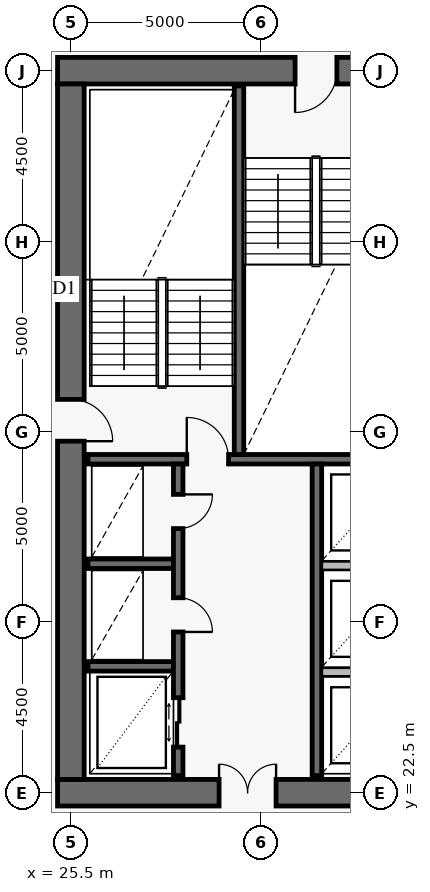
"""IFC4 building model, lengths in metres.
Left out: names, types, materials, properties, quantities, classifications, styles, units other than length and angle.
Written with IfcOpenShell. Run it as: python <this file> out.ifc"""

import sys

from ifc_helpers import new_model, si_unit, direction, frame, frame_2d, origin, place, context, subcontext, project, spatial, rectangle, extrude, element, fill, save


model = new_model("IFC4")
c1 = context("Model", 3, precision=1e-05, world=origin(), true_north=direction((0.0, 1.0)))
c2 = subcontext(c1, "Body", "Model", "MODEL_VIEW")
j1 = project(units=[si_unit("LENGTHUNIT", "METRE"), si_unit("PLANEANGLEUNIT", "RADIAN")], contexts=[c1])
p1 = place(None, origin())
s1 = spatial("IfcSite", under=j1, at=p1, CompositionType="ELEMENT")
p2 = place(p1, origin())
s2 = spatial("IfcBuilding", under=s1, at=p2, CompositionType="ELEMENT")
p3 = place(p2, frame((0.0, 0.0, 138.0)))
s3 = spatial("IfcBuildingStorey", under=s2, at=p3, CompositionType="ELEMENT", Elevation=138.0)
p4 = place(p3, frame((25.15, 22.5, 0.0), z_axis=(0.0, 0.0, 1.0), x_axis=(1.0, 0.0, 0.0)))
e1 = element("IfcWall", 1, at=p4, inside=s3, PredefinedType="SHEAR", context=c2, shape_type="SweptSolid", body=[
    extrude(rectangle(XDim=9.9, YDim=0.7, at=frame_2d((4.95, 0.0))), origin(), (0.0, 0.0, 1.0), 3.8),
])
p5 = place(p4, frame((4.25, 0.0, 0.0)))
e2 = element("IfcOpeningElement", 2, at=p5, cuts=e1, PredefinedType="OPENING", context=c2, shape_type="SweptSolid", body=[
    extrude(rectangle(XDim=1.5, YDim=2.15, at=frame_2d((0.75, 1.075))), frame((0.0, 0.362, 0.0), z_axis=(0.0, -1.0, 0.0), x_axis=(1.0, 0.0, 0.0)), (0.0, 0.0, 1.0), 0.724),
])
p6 = place(p3, frame((36.75, 41.5, 0.0), z_axis=(0.0, 0.0, 1.0), x_axis=(-1.0, 0.0, 0.0)))
e3 = element("IfcWall", 3, at=p6, inside=s3, PredefinedType="SHEAR", context=c2, shape_type="SweptSolid", body=[
    extrude(rectangle(XDim=11.6, YDim=0.7, at=frame_2d((5.8, 0.0))), origin(), (0.0, 0.0, 1.0), 3.8),
])
p7 = place(p6, frame((4.25, 0.0, 0.0)))
e4 = element("IfcOpeningElement", 4, at=p7, cuts=e3, PredefinedType="OPENING", context=c2, shape_type="SweptSolid", body=[
    extrude(rectangle(XDim=1.1, YDim=2.15, at=frame_2d((0.55, 1.075))), frame((0.0, 0.362, 0.0), z_axis=(0.0, -1.0, 0.0), x_axis=(1.0, 0.0, 0.0)), (0.0, 0.0, 1.0), 0.724),
])
p8 = place(p3, frame((25.5, 22.85, 0.0), z_axis=(0.0, 0.0, 1.0), x_axis=(0.0, 1.0, 0.0)))
e5 = element("IfcWall", 5, at=p8, inside=s3, PredefinedType="SHEAR", context=c2, shape_type="SweptSolid", body=[
    extrude(rectangle(XDim=18.3, YDim=0.7, at=frame_2d((9.15, 0.0))), origin(), (0.0, 0.0, 1.0), 3.8),
])
p9 = place(p8, frame((8.9, 0.0, 0.0)))
e6 = element("IfcOpeningElement", 6, at=p9, cuts=e5, PredefinedType="OPENING", context=c2, shape_type="SweptSolid", body=[
    extrude(rectangle(XDim=1.1, YDim=2.15, at=frame_2d((0.55, 1.075))), frame((0.0, 0.362, 0.0), z_axis=(0.0, -1.0, 0.0), x_axis=(1.0, 0.0, 0.0)), (0.0, 0.0, 1.0), 0.724),
])
p10 = place(p3, frame((25.95, 31.275, 0.0), z_axis=(0.0, 0.0, 1.0), x_axis=(1.0, 0.0, 0.0)))
e7 = element("IfcWall", 7, at=p10, inside=s3, PredefinedType="SOLIDWALL", context=c2, shape_type="SweptSolid", body=[
    extrude(rectangle(XDim=20.1, YDim=0.25, at=frame_2d((10.05, 0.0))), origin(), (0.0, 0.0, 1.0), 3.8),
])
p11 = place(p10, frame((2.6, 0.0, 0.0)))
e8 = element("IfcOpeningElement", 8, at=p11, cuts=e7, PredefinedType="OPENING", context=c2, shape_type="SweptSolid", body=[
    extrude(rectangle(XDim=1.1, YDim=2.15, at=frame_2d((0.55, 1.075))), frame((0.0, 0.137, 0.0), z_axis=(0.0, -1.0, 0.0), x_axis=(1.0, 0.0, 0.0)), (0.0, 0.0, 1.0), 0.274),
])
p12 = place(p10, frame((10.6, 0.0, 0.0)))
e9 = element("IfcOpeningElement", 9, at=p12, cuts=e7, PredefinedType="OPENING", context=c2, shape_type="SweptSolid", body=[
    extrude(rectangle(XDim=1.1, YDim=2.15, at=frame_2d((0.55, 1.075))), frame((0.0, 0.137, 0.0), z_axis=(0.0, -1.0, 0.0), x_axis=(1.0, 0.0, 0.0)), (0.0, 0.0, 1.0), 0.274),
])
p13 = place(p10, frame((16.35, 0.0, 0.0)))
e10 = element("IfcOpeningElement", 10, at=p13, cuts=e7, PredefinedType="OPENING", context=c2, shape_type="SweptSolid", body=[
    extrude(rectangle(XDim=1.1, YDim=2.15, at=frame_2d((0.55, 1.075))), frame((0.0, 0.137, 0.0), z_axis=(0.0, -1.0, 0.0), x_axis=(1.0, 0.0, 0.0)), (0.0, 0.0, 1.0), 0.274),
])
p14 = place(p3, frame((29.925, 31.4, 0.0), z_axis=(0.0, 0.0, 1.0), x_axis=(0.0, 1.0, 0.0)))
e11 = element("IfcWall", 11, at=p14, inside=s3, PredefinedType="SOLIDWALL", context=c2, shape_type="SweptSolid", body=[
    extrude(rectangle(XDim=9.7, YDim=0.25, at=frame_2d((4.85, 0.0))), origin(), (0.0, 0.0, 1.0), 3.8),
])
for number, where, z_axis, x_axis in (
    (12, (25.95, 25.825, 0.0), (0.0, 0.0, 1.0), (1.0, 0.0, 0.0)),
    (13, (25.95, 28.525, 0.0), (0.0, 0.0, 1.0), (1.0, 0.0, 0.0)),
):
    element("IfcWall", number, at=place(p3, frame(where, z_axis=z_axis, x_axis=x_axis)), inside=s3, PredefinedType="SOLIDWALL", context=c2, shape_type="SweptSolid", body=[
        extrude(rectangle(XDim=2.25, YDim=0.25, at=frame_2d((1.125, 0.0))), origin(), (0.0, 0.0, 1.0), 3.8),
    ])
p15 = place(p3, frame((28.325, 22.95, 0.0), z_axis=(0.0, 0.0, 1.0), x_axis=(0.0, 1.0, 0.0)))
e14 = element("IfcWall", 14, at=p15, inside=s3, PredefinedType="SOLIDWALL", context=c2, shape_type="SweptSolid", body=[
    extrude(rectangle(XDim=8.2, YDim=0.25, at=frame_2d((4.1, 0.0))), origin(), (0.0, 0.0, 1.0), 3.8),
])
p16 = place(p15, frame((0.75, 0.0, 0.0)))
e15 = element("IfcOpeningElement", 15, at=p16, cuts=e14, PredefinedType="OPENING", context=c2, shape_type="SweptSolid", body=[
    extrude(rectangle(XDim=1.3, YDim=2.3, at=frame_2d((0.65, 1.15))), frame((0.0, 0.137, 0.0), z_axis=(0.0, -1.0, 0.0), x_axis=(1.0, 0.0, 0.0)), (0.0, 0.0, 1.0), 0.274),
])
p17 = place(p15, frame((3.78, 0.0, 0.0)))
e16 = element("IfcOpeningElement", 16, at=p17, cuts=e14, PredefinedType="OPENING", context=c2, shape_type="SweptSolid", body=[
    extrude(rectangle(XDim=0.9, YDim=2.1, at=frame_2d((0.45, 1.05))), frame((0.0, 0.137, 0.0), z_axis=(0.0, -1.0, 0.0), x_axis=(1.0, 0.0, 0.0)), (0.0, 0.0, 1.0), 0.274),
])
p18 = place(p15, frame((6.5, 0.0, 0.0)))
e17 = element("IfcOpeningElement", 17, at=p18, cuts=e14, PredefinedType="OPENING", context=c2, shape_type="SweptSolid", body=[
    extrude(rectangle(XDim=0.9, YDim=2.1, at=frame_2d((0.45, 1.05))), frame((0.0, 0.137, 0.0), z_axis=(0.0, -1.0, 0.0), x_axis=(1.0, 0.0, 0.0)), (0.0, 0.0, 1.0), 0.274),
])
p19 = place(p3, frame((31.975, 22.95, 0.0), z_axis=(0.0, 0.0, 1.0), x_axis=(0.0, 1.0, 0.0)))
e18 = element("IfcWall", 18, at=p19, inside=s3, PredefinedType="SOLIDWALL", context=c2, shape_type="SweptSolid", body=[
    extrude(rectangle(XDim=8.2, YDim=0.25, at=frame_2d((4.1, 0.0))), origin(), (0.0, 0.0, 1.0), 3.8),
])
for number, where, z_axis, x_axis in (
    (19, (32.108, 25.675, 0.0), (0.0, 0.0, 1.0), (1.0, 0.0, 0.0)),
    (20, (32.108, 28.475, 0.0), (0.0, 0.0, 1.0), (1.0, 0.0, 0.0)),
):
    element("IfcWall", number, at=place(p3, frame(where, z_axis=z_axis, x_axis=x_axis)), inside=s3, PredefinedType="PARTITIONING", context=c2, shape_type="SweptSolid", body=[
        extrude(rectangle(XDim=2.284, YDim=0.22, at=frame_2d((1.142, 0.0))), origin(), (0.0, 0.0, 1.0), 3.55),
    ])
p20 = place(p9, frame((1.1, 0.0, 0.0), z_axis=(0.0, 0.0, 1.0), x_axis=(-1.0, 0.0, 0.0)))
e21 = element("IfcDoor", 21, at=p20, inside=s3, OperationType="SINGLE_SWING_RIGHT", PredefinedType="USERDEFINED", context=c2, shape_type="SweptSolid", body=[
    extrude(rectangle(XDim=1.1, YDim=2.15, at=frame_2d((0.55, 1.075))), frame((0.0, 0.025, 0.0), z_axis=(0.0, -1.0, 0.0), x_axis=(1.0, 0.0, 0.0)), (0.0, 0.0, 1.0), 0.05),
])
fill(e6, e21)
p21 = place(p7, origin())
e22 = element("IfcDoor", 22, at=p21, inside=s3, OperationType="SINGLE_SWING_RIGHT", PredefinedType="USERDEFINED", context=c2, shape_type="SweptSolid", body=[
    extrude(rectangle(XDim=1.1, YDim=2.15, at=frame_2d((0.55, 1.075))), frame((0.0, 0.025, 0.0), z_axis=(0.0, -1.0, 0.0), x_axis=(1.0, 0.0, 0.0)), (0.0, 0.0, 1.0), 0.05),
])
fill(e4, e22)
p22 = place(p5, origin())
e23 = element("IfcDoor", 23, at=p22, inside=s3, OperationType="DOUBLE_DOOR_SINGLE_SWING", PredefinedType="DOOR", context=c2, shape_type="SweptSolid", body=[
    extrude(rectangle(XDim=1.5, YDim=2.15, at=frame_2d((0.75, 1.075))), frame((0.0, 0.025, 0.0), z_axis=(0.0, -1.0, 0.0), x_axis=(1.0, 0.0, 0.0)), (0.0, 0.0, 1.0), 0.05),
])
fill(e2, e23)
p23 = place(p11, origin())
e24 = element("IfcDoor", 24, at=p23, inside=s3, OperationType="SINGLE_SWING_LEFT", PredefinedType="USERDEFINED", context=c2, shape_type="SweptSolid", body=[
    extrude(rectangle(XDim=1.1, YDim=2.15, at=frame_2d((0.55, 1.075))), frame((0.0, 0.025, 0.0), z_axis=(0.0, -1.0, 0.0), x_axis=(1.0, 0.0, 0.0)), (0.0, 0.0, 1.0), 0.05),
])
fill(e8, e24)
p24 = place(p16, frame((1.3, 0.0, 0.0), z_axis=(0.0, 0.0, 1.0), x_axis=(-1.0, 0.0, 0.0)))
e25 = element("IfcDoor", 25, at=p24, inside=s3, OperationType="DOUBLE_DOOR_SLIDING", PredefinedType="DOOR", context=c2, shape_type="SweptSolid", body=[
    extrude(rectangle(XDim=1.3, YDim=2.3, at=frame_2d((0.65, 1.15))), frame((0.0, 0.025, 0.0), z_axis=(0.0, -1.0, 0.0), x_axis=(1.0, 0.0, 0.0)), (0.0, 0.0, 1.0), 0.05),
])
fill(e15, e25)
p25 = place(p17, frame((0.9, 0.0, 0.0), z_axis=(0.0, 0.0, 1.0), x_axis=(-1.0, 0.0, 0.0)))
e26 = element("IfcDoor", 26, at=p25, inside=s3, OperationType="SINGLE_SWING_RIGHT", PredefinedType="DOOR", context=c2, shape_type="SweptSolid", body=[
    extrude(rectangle(XDim=0.9, YDim=2.1, at=frame_2d((0.45, 1.05))), frame((0.0, 0.025, 0.0), z_axis=(0.0, -1.0, 0.0), x_axis=(1.0, 0.0, 0.0)), (0.0, 0.0, 1.0), 0.05),
])
fill(e16, e26)
p26 = place(p18, frame((0.9, 0.0, 0.0), z_axis=(0.0, 0.0, 1.0), x_axis=(-1.0, 0.0, 0.0)))
e27 = element("IfcDoor", 27, at=p26, inside=s3, OperationType="SINGLE_SWING_LEFT", PredefinedType="DOOR", context=c2, shape_type="SweptSolid", body=[
    extrude(rectangle(XDim=0.9, YDim=2.1, at=frame_2d((0.45, 1.05))), frame((0.0, 0.025, 0.0), z_axis=(0.0, -1.0, 0.0), x_axis=(1.0, 0.0, 0.0)), (0.0, 0.0, 1.0), 0.05),
])
fill(e17, e27)
save(model, sys.argv[1])
